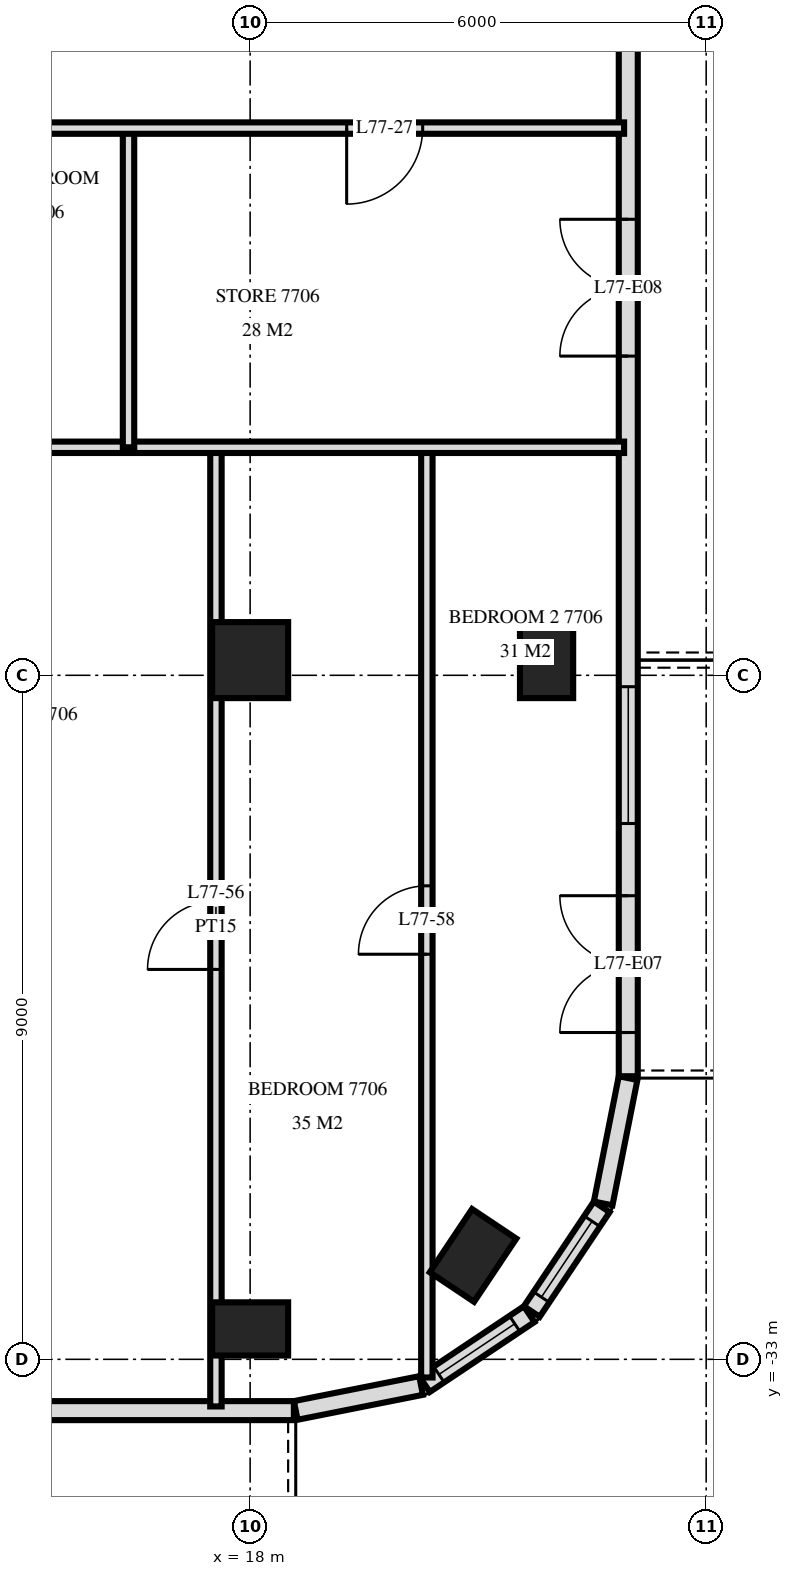
"""IFC4 building model, lengths in metres.
Left out: names, types, materials, properties, quantities, classifications, styles, units other than length and angle.
Written with IfcOpenShell. Run it as: python <this file> out.ifc"""

import sys

from ifc_helpers import new_model, si_unit, direction, frame, frame_2d, origin, origin_2d, place, context, subcontext, project, spatial, rectangle, extrude, element, fill, save


model = new_model("IFC4")
c1 = context("Model", 3, precision=1e-05, world=origin(), true_north=direction((0.0, 1.0)))
c2 = subcontext(c1, "Body", "Model", "MODEL_VIEW")
j1 = project(units=[si_unit("LENGTHUNIT", "METRE"), si_unit("PLANEANGLEUNIT", "RADIAN")], contexts=[c1])
p1 = place(None, origin())
s1 = spatial("IfcSite", under=j1, at=p1, CompositionType="ELEMENT")
p2 = place(p1, origin())
s2 = spatial("IfcBuilding", under=s1, at=p2, CompositionType="ELEMENT")
p3 = place(p2, frame((0.0, 0.0, 291.1)))
s3 = spatial("IfcBuildingStorey", under=s2, at=p3, CompositionType="ELEMENT", Elevation=291.1)
p4 = place(p3, frame((18.0, -32.6, 0.0), z_axis=(0.0, 0.0, 1.0), x_axis=(1.0, 0.0, 0.0)))
e1 = element("IfcColumn", 1, at=p4, inside=s3, PredefinedType="COLUMN", context=c2, shape_type="SweptSolid", body=[
    extrude(rectangle(XDim=1.0, YDim=0.7, at=origin_2d()), origin(), (0.0, 0.0, 1.0), 3.5),
])
p5 = place(p3, frame((18.0, -23.8, 0.0), z_axis=(0.0, 0.0, 1.0), x_axis=(1.0, 0.0, 0.0)))
e2 = element("IfcColumn", 2, at=p5, inside=s3, PredefinedType="COLUMN", context=c2, shape_type="SweptSolid", body=[
    extrude(rectangle(XDim=1.0, YDim=1.0, at=origin_2d()), origin(), (0.0, 0.0, 1.0), 3.5),
])
for number, where, z_axis, x_axis in (
    (3, (20.933, -31.633, 0.0), (0.0, 0.0, 1.0), (0.556, 0.831, 0.0)),
    (4, (21.9, -23.8, 0.0), (0.0, 0.0, 1.0), (0.0, 1.0, 0.0)),
):
    element("IfcColumn", number, at=place(p3, frame(where, z_axis=z_axis, x_axis=x_axis)), inside=s3, PredefinedType="COLUMN", context=c2, shape_type="SweptSolid", body=[
        extrude(rectangle(XDim=1.0, YDim=0.7, at=origin_2d()), origin(), (0.0, 0.0, 1.0), 3.5),
    ])
p6 = place(p3, frame((-18.575, -33.675, 0.0), z_axis=(0.0, 0.0, 1.0), x_axis=(1.0, 0.0, 0.0)))
e5 = element("IfcWall", 5, at=p6, inside=s3, PredefinedType="SOLIDWALL", context=c2, shape_type="SweptSolid", body=[
    extrude(rectangle(XDim=37.151, YDim=0.25, at=frame_2d((18.575, 0.0))), origin(), (0.0, 0.0, 1.0), 3.22),
])
p7 = place(p6, frame((1.175, 0.0, 0.0)))
e6 = element("IfcOpeningElement", 6, at=p7, cuts=e5, PredefinedType="OPENING", context=c2, shape_type="SweptSolid", body=[
    extrude(rectangle(XDim=1.8, YDim=2.4, at=frame_2d((0.9, 1.2))), frame((0.0, 0.135, 0.0), z_axis=(0.0, -1.0, 0.0), x_axis=(1.0, 0.0, 0.0)), (0.0, 0.0, 1.0), 0.27),
])
p8 = place(p6, frame((4.4, 0.0, 0.9)))
e7 = element("IfcOpeningElement", 7, at=p8, cuts=e5, PredefinedType="OPENING", context=c2, shape_type="SweptSolid", body=[
    extrude(rectangle(XDim=1.8, YDim=1.5, at=frame_2d((0.9, 0.75))), frame((0.0, 0.135, 0.0), z_axis=(0.0, -1.0, 0.0), x_axis=(1.0, 0.0, 0.0)), (0.0, 0.0, 1.0), 0.27),
])
p9 = place(p6, frame((6.875, 0.0, 0.9)))
e8 = element("IfcOpeningElement", 8, at=p9, cuts=e5, PredefinedType="OPENING", context=c2, shape_type="SweptSolid", body=[
    extrude(rectangle(XDim=2.4, YDim=1.5, at=frame_2d((1.2, 0.75))), frame((0.0, 0.135, 0.0), z_axis=(0.0, -1.0, 0.0), x_axis=(1.0, 0.0, 0.0)), (0.0, 0.0, 1.0), 0.27),
])
p10 = place(p6, frame((10.175, 0.0, 0.0)))
e9 = element("IfcOpeningElement", 9, at=p10, cuts=e5, PredefinedType="OPENING", context=c2, shape_type="SweptSolid", body=[
    extrude(rectangle(XDim=1.8, YDim=2.4, at=frame_2d((0.9, 1.2))), frame((0.0, 0.135, 0.0), z_axis=(0.0, -1.0, 0.0), x_axis=(1.0, 0.0, 0.0)), (0.0, 0.0, 1.0), 0.27),
])
p11 = place(p6, frame((13.175, 0.0, 0.0)))
e10 = element("IfcOpeningElement", 10, at=p11, cuts=e5, PredefinedType="OPENING", context=c2, shape_type="SweptSolid", body=[
    extrude(rectangle(XDim=1.8, YDim=2.4, at=frame_2d((0.9, 1.2))), frame((0.0, 0.135, 0.0), z_axis=(0.0, -1.0, 0.0), x_axis=(1.0, 0.0, 0.0)), (0.0, 0.0, 1.0), 0.27),
])
p12 = place(p6, frame((15.875, 0.0, 0.9)))
e11 = element("IfcOpeningElement", 11, at=p12, cuts=e5, PredefinedType="OPENING", context=c2, shape_type="SweptSolid", body=[
    extrude(rectangle(XDim=2.4, YDim=1.5, at=frame_2d((1.2, 0.75))), frame((0.0, 0.135, 0.0), z_axis=(0.0, -1.0, 0.0), x_axis=(1.0, 0.0, 0.0)), (0.0, 0.0, 1.0), 0.27),
])
p13 = place(p6, frame((19.175, 0.0, 0.0)))
e12 = element("IfcOpeningElement", 12, at=p13, cuts=e5, PredefinedType="OPENING", context=c2, shape_type="SweptSolid", body=[
    extrude(rectangle(XDim=1.8, YDim=2.4, at=frame_2d((0.9, 1.2))), frame((0.0, 0.135, 0.0), z_axis=(0.0, -1.0, 0.0), x_axis=(1.0, 0.0, 0.0)), (0.0, 0.0, 1.0), 0.27),
])
p14 = place(p6, frame((21.875, 0.0, 0.9)))
e13 = element("IfcOpeningElement", 13, at=p14, cuts=e5, PredefinedType="OPENING", context=c2, shape_type="SweptSolid", body=[
    extrude(rectangle(XDim=2.4, YDim=1.5, at=frame_2d((1.2, 0.75))), frame((0.0, 0.135, 0.0), z_axis=(0.0, -1.0, 0.0), x_axis=(1.0, 0.0, 0.0)), (0.0, 0.0, 1.0), 0.27),
])
p15 = place(p6, frame((25.063, 0.0, 0.9)))
e14 = element("IfcOpeningElement", 14, at=p15, cuts=e5, PredefinedType="OPENING", context=c2, shape_type="SweptSolid", body=[
    extrude(rectangle(XDim=1.8, YDim=1.5, at=frame_2d((0.9, 0.75))), frame((0.0, 0.135, 0.0), z_axis=(0.0, -1.0, 0.0), x_axis=(1.0, 0.0, 0.0)), (0.0, 0.0, 1.0), 0.27),
])
p16 = place(p6, frame((27.838, 0.0, 0.0)))
e15 = element("IfcOpeningElement", 15, at=p16, cuts=e5, PredefinedType="OPENING", context=c2, shape_type="SweptSolid", body=[
    extrude(rectangle(XDim=1.8, YDim=2.4, at=frame_2d((0.9, 1.2))), frame((0.0, 0.135, 0.0), z_axis=(0.0, -1.0, 0.0), x_axis=(1.0, 0.0, 0.0)), (0.0, 0.0, 1.0), 0.27),
])
p17 = place(p6, frame((31.175, 0.0, 0.0)))
e16 = element("IfcOpeningElement", 16, at=p17, cuts=e5, PredefinedType="OPENING", context=c2, shape_type="SweptSolid", body=[
    extrude(rectangle(XDim=1.8, YDim=2.4, at=frame_2d((0.9, 1.2))), frame((0.0, 0.135, 0.0), z_axis=(0.0, -1.0, 0.0), x_axis=(1.0, 0.0, 0.0)), (0.0, 0.0, 1.0), 0.27),
])
p18 = place(p3, frame((18.6, -33.673, 0.0), z_axis=(0.0, 0.0, 1.0), x_axis=(0.980770110232, 0.195166572128, 0.0)))
e17 = element("IfcWall", 17, at=p18, inside=s3, PredefinedType="SOLIDWALL", context=c2, shape_type="SweptSolid", body=[
    extrude(rectangle(XDim=1.681, YDim=0.25, at=frame_2d((0.841, 0.0))), origin(), (0.0, 0.0, 1.0), 3.22),
])
p19 = place(p3, frame((20.294, -33.326, 0.0), z_axis=(0.0, 0.0, 1.0), x_axis=(0.831482937015, 0.55555029066, 0.0)))
e18 = element("IfcWall", 18, at=p19, inside=s3, PredefinedType="SOLIDWALL", context=c2, shape_type="SweptSolid", body=[
    extrude(rectangle(XDim=1.656, YDim=0.25, at=frame_2d((0.828, 0.0))), origin(), (0.0, 0.0, 1.0), 3.22),
])
p20 = place(p19, frame((0.228, 0.0, 0.9)))
e19 = element("IfcOpeningElement", 19, at=p20, cuts=e18, PredefinedType="OPENING", context=c2, shape_type="SweptSolid", body=[
    extrude(rectangle(XDim=1.2, YDim=1.5, at=frame_2d((0.6, 0.75))), frame((0.0, 0.135, 0.0), z_axis=(0.0, -1.0, 0.0), x_axis=(1.0, 0.0, 0.0)), (0.0, 0.0, 1.0), 0.27),
])
p21 = place(p3, frame((21.706, -32.371, 0.0), z_axis=(0.0, 0.0, 1.0), x_axis=(0.55555029066, 0.831482937015, 0.0)))
e20 = element("IfcWall", 20, at=p21, inside=s3, PredefinedType="SOLIDWALL", context=c2, shape_type="SweptSolid", body=[
    extrude(rectangle(XDim=1.656, YDim=0.25, at=frame_2d((0.828, 0.0))), origin(), (0.0, 0.0, 1.0), 3.22),
])
p22 = place(p21, frame((0.228, 0.0, 0.9)))
e21 = element("IfcOpeningElement", 21, at=p22, cuts=e20, PredefinedType="OPENING", context=c2, shape_type="SweptSolid", body=[
    extrude(rectangle(XDim=1.2, YDim=1.5, at=frame_2d((0.6, 0.75))), frame((0.0, 0.135, 0.0), z_axis=(0.0, -1.0, 0.0), x_axis=(1.0, 0.0, 0.0)), (0.0, 0.0, 1.0), 0.27),
])
p23 = place(p3, frame((22.645, -30.949, 0.0), z_axis=(0.0, 0.0, 1.0), x_axis=(0.19513878023, 0.980775640221, 0.0)))
e22 = element("IfcWall", 22, at=p23, inside=s3, PredefinedType="SOLIDWALL", context=c2, shape_type="SweptSolid", body=[
    extrude(rectangle(XDim=1.681, YDim=0.25, at=frame_2d((0.841, 0.0))), origin(), (0.0, 0.0, 1.0), 3.22),
])
p24 = place(p3, frame((22.975, -29.275, 0.0), z_axis=(0.0, 0.0, 1.0), x_axis=(0.0, 1.0, 0.0)))
e23 = element("IfcWall", 23, at=p24, inside=s3, PredefinedType="SOLIDWALL", context=c2, shape_type="SweptSolid", body=[
    extrude(rectangle(XDim=25.951, YDim=0.25, at=frame_2d((12.975, 0.0))), origin(), (0.0, 0.0, 1.0), 3.22),
])
p25 = place(p24, frame((0.575, 0.0, 0.0)))
e24 = element("IfcOpeningElement", 24, at=p25, cuts=e23, PredefinedType="OPENING", context=c2, shape_type="SweptSolid", body=[
    extrude(rectangle(XDim=1.8, YDim=2.4, at=frame_2d((0.9, 1.2))), frame((0.0, 0.135, 0.0), z_axis=(0.0, -1.0, 0.0), x_axis=(1.0, 0.0, 0.0)), (0.0, 0.0, 1.0), 0.27),
])
p26 = place(p24, frame((3.325, 0.0, 0.9)))
e25 = element("IfcOpeningElement", 25, at=p26, cuts=e23, PredefinedType="OPENING", context=c2, shape_type="SweptSolid", body=[
    extrude(rectangle(XDim=1.8, YDim=1.5, at=frame_2d((0.9, 0.75))), frame((0.0, 0.135, 0.0), z_axis=(0.0, -1.0, 0.0), x_axis=(1.0, 0.0, 0.0)), (0.0, 0.0, 1.0), 0.27),
])
p27 = place(p24, frame((9.475, 0.0, 0.0)))
e26 = element("IfcOpeningElement", 26, at=p27, cuts=e23, PredefinedType="OPENING", context=c2, shape_type="SweptSolid", body=[
    extrude(rectangle(XDim=1.8, YDim=2.4, at=frame_2d((0.9, 1.2))), frame((0.0, 0.135, 0.0), z_axis=(0.0, -1.0, 0.0), x_axis=(1.0, 0.0, 0.0)), (0.0, 0.0, 1.0), 0.27),
])
p28 = place(p24, frame((16.175, 0.0, 0.0)))
e27 = element("IfcOpeningElement", 27, at=p28, cuts=e23, PredefinedType="OPENING", context=c2, shape_type="SweptSolid", body=[
    extrude(rectangle(XDim=1.8, YDim=2.4, at=frame_2d((0.9, 1.2))), frame((0.0, 0.135, 0.0), z_axis=(0.0, -1.0, 0.0), x_axis=(1.0, 0.0, 0.0)), (0.0, 0.0, 1.0), 0.27),
])
p29 = place(p24, frame((22.675, 0.0, 0.0)))
e28 = element("IfcOpeningElement", 28, at=p29, cuts=e23, PredefinedType="OPENING", context=c2, shape_type="SweptSolid", body=[
    extrude(rectangle(XDim=1.8, YDim=2.4, at=frame_2d((0.9, 1.2))), frame((0.0, 0.135, 0.0), z_axis=(0.0, -1.0, 0.0), x_axis=(1.0, 0.0, 0.0)), (0.0, 0.0, 1.0), 0.27),
])
p30 = place(p3, frame((20.325, -33.239, 0.0), z_axis=(0.0, 0.0, 1.0), x_axis=(0.0, 1.0, 0.0)))
e29 = element("IfcWall", 29, at=p30, inside=s3, PredefinedType="PARTITIONING", context=c2, shape_type="SweptSolid", body=[
    extrude(rectangle(XDim=12.239, YDim=0.15, at=frame_2d((6.12, 0.0))), origin(), (0.0, 0.0, 1.0), 3.22),
])
p31 = place(p30, frame((5.569, 0.0, 0.0)))
e30 = element("IfcOpeningElement", 30, at=p31, cuts=e29, PredefinedType="OPENING", context=c2, shape_type="SweptSolid", body=[
    extrude(rectangle(XDim=0.9, YDim=2.1, at=frame_2d((0.45, 1.05))), frame((0.0, 0.085, 0.0), z_axis=(0.0, -1.0, 0.0), x_axis=(1.0, 0.0, 0.0)), (0.0, 0.0, 1.0), 0.17),
])
p32 = place(p3, frame((17.55, -33.62, 0.0), z_axis=(0.0, 0.0, 1.0), x_axis=(0.0, 1.0, 0.0)))
e31 = element("IfcWall", 31, at=p32, inside=s3, PredefinedType="PARTITIONING", context=c2, shape_type="SweptSolid", body=[
    extrude(rectangle(XDim=12.62, YDim=0.15, at=frame_2d((6.31, 0.0))), origin(), (0.0, 0.0, 1.0), 3.22),
])
p33 = place(p32, frame((5.75, 0.0, 0.0)))
e32 = element("IfcOpeningElement", 32, at=p33, cuts=e31, PredefinedType="OPENING", context=c2, shape_type="SweptSolid", body=[
    extrude(rectangle(XDim=0.9, YDim=2.1, at=frame_2d((0.45, 1.05))), frame((0.0, 0.085, 0.0), z_axis=(0.0, -1.0, 0.0), x_axis=(1.0, 0.0, 0.0)), (0.0, 0.0, 1.0), 0.17),
])
p34 = place(p3, frame((16.4, -21.0, 0.0), z_axis=(0.0, 0.0, 1.0), x_axis=(0.0, 1.0, 0.0)))
e33 = element("IfcWall", 33, at=p34, inside=s3, PredefinedType="PARTITIONING", context=c2, shape_type="SweptSolid", body=[
    extrude(rectangle(XDim=4.2, YDim=0.15, at=frame_2d((2.1, 0.0))), origin(), (0.0, 0.0, 1.0), 3.22),
])
p35 = place(p3, frame((14.0, -21.0, 0.0), z_axis=(0.0, 0.0, 1.0), x_axis=(1.0, 0.0, 0.0)))
e34 = element("IfcWall", 34, at=p35, inside=s3, PredefinedType="PARTITIONING", context=c2, shape_type="SweptSolid", body=[
    extrude(rectangle(XDim=8.92, YDim=0.15, at=frame_2d((4.46, 0.0))), origin(), (0.0, 0.0, 1.0), 3.22),
])
p36 = place(p3, frame((-22.92, -16.8, 0.0), z_axis=(0.0, 0.0, 1.0), x_axis=(1.0, 0.0, 0.0)))
e35 = element("IfcWall", 35, at=p36, inside=s3, PredefinedType="PARTITIONING", context=c2, shape_type="SweptSolid", body=[
    extrude(rectangle(XDim=45.84, YDim=0.15, at=frame_2d((22.92, 0.0))), origin(), (0.0, 0.0, 1.0), 3.22),
])
p37 = place(p36, frame((16.72, 0.0, 0.0)))
e36 = element("IfcOpeningElement", 36, at=p37, cuts=e35, PredefinedType="OPENING", context=c2, shape_type="SweptSolid", body=[
    extrude(rectangle(XDim=1.0, YDim=2.1, at=frame_2d((0.5, 1.05))), frame((0.0, 0.085, 0.0), z_axis=(0.0, -1.0, 0.0), x_axis=(1.0, 0.0, 0.0)), (0.0, 0.0, 1.0), 0.17),
])
p38 = place(p36, frame((18.52, 0.0, 0.0)))
e37 = element("IfcOpeningElement", 37, at=p38, cuts=e35, PredefinedType="OPENING", context=c2, shape_type="SweptSolid", body=[
    extrude(rectangle(XDim=1.0, YDim=2.1, at=frame_2d((0.5, 1.05))), frame((0.0, 0.085, 0.0), z_axis=(0.0, -1.0, 0.0), x_axis=(1.0, 0.0, 0.0)), (0.0, 0.0, 1.0), 0.17),
])
p39 = place(p36, frame((21.77, 0.0, 0.0)))
e38 = element("IfcOpeningElement", 38, at=p39, cuts=e35, PredefinedType="OPENING", context=c2, shape_type="SweptSolid", body=[
    extrude(rectangle(XDim=1.0, YDim=2.1, at=frame_2d((0.5, 1.05))), frame((0.0, 0.085, 0.0), z_axis=(0.0, -1.0, 0.0), x_axis=(1.0, 0.0, 0.0)), (0.0, 0.0, 1.0), 0.17),
])
p40 = place(p36, frame((23.07, 0.0, 0.0)))
e39 = element("IfcOpeningElement", 39, at=p40, cuts=e35, PredefinedType="OPENING", context=c2, shape_type="SweptSolid", body=[
    extrude(rectangle(XDim=1.0, YDim=2.1, at=frame_2d((0.5, 1.05))), frame((0.0, 0.085, 0.0), z_axis=(0.0, -1.0, 0.0), x_axis=(1.0, 0.0, 0.0)), (0.0, 0.0, 1.0), 0.17),
])
p41 = place(p36, frame((27.77, 0.0, 0.0)))
e40 = element("IfcOpeningElement", 40, at=p41, cuts=e35, PredefinedType="OPENING", context=c2, shape_type="SweptSolid", body=[
    extrude(rectangle(XDim=1.0, YDim=2.1, at=frame_2d((0.5, 1.05))), frame((0.0, 0.085, 0.0), z_axis=(0.0, -1.0, 0.0), x_axis=(1.0, 0.0, 0.0)), (0.0, 0.0, 1.0), 0.17),
])
p42 = place(p36, frame((7.02, 0.0, 0.0)))
e41 = element("IfcOpeningElement", 41, at=p42, cuts=e35, PredefinedType="OPENING", context=c2, shape_type="SweptSolid", body=[
    extrude(rectangle(XDim=1.0, YDim=2.1, at=frame_2d((0.5, 1.05))), frame((0.0, 0.085, 0.0), z_axis=(0.0, -1.0, 0.0), x_axis=(1.0, 0.0, 0.0)), (0.0, 0.0, 1.0), 0.17),
])
p43 = place(p36, frame((35.42, 0.0, 0.0)))
e42 = element("IfcOpeningElement", 42, at=p43, cuts=e35, PredefinedType="OPENING", context=c2, shape_type="SweptSolid", body=[
    extrude(rectangle(XDim=1.0, YDim=2.1, at=frame_2d((0.5, 1.05))), frame((0.0, 0.085, 0.0), z_axis=(0.0, -1.0, 0.0), x_axis=(1.0, 0.0, 0.0)), (0.0, 0.0, 1.0), 0.17),
])
p44 = place(p36, frame((42.19, 0.0, 0.0)))
e43 = element("IfcOpeningElement", 43, at=p44, cuts=e35, PredefinedType="OPENING", context=c2, shape_type="SweptSolid", body=[
    extrude(rectangle(XDim=1.0, YDim=2.1, at=frame_2d((0.5, 1.05))), frame((0.0, 0.085, 0.0), z_axis=(0.0, -1.0, 0.0), x_axis=(1.0, 0.0, 0.0)), (0.0, 0.0, 1.0), 0.17),
])
p45 = place(p20, origin())
e44 = element("IfcWindow", 44, at=p45, inside=s3, PartitioningType="SINGLE_PANEL", PredefinedType="WINDOW", context=c2, shape_type="SweptSolid", body=[
    extrude(rectangle(XDim=1.2, YDim=1.5, at=frame_2d((0.6, 0.75))), frame((0.0, 0.03, 0.0), z_axis=(0.0, -1.0, 0.0), x_axis=(1.0, 0.0, 0.0)), (0.0, 0.0, 1.0), 0.06),
])
fill(e19, e44)
p46 = place(p22, origin())
e45 = element("IfcWindow", 45, at=p46, inside=s3, PartitioningType="SINGLE_PANEL", PredefinedType="WINDOW", context=c2, shape_type="SweptSolid", body=[
    extrude(rectangle(XDim=1.2, YDim=1.5, at=frame_2d((0.6, 0.75))), frame((0.0, 0.03, 0.0), z_axis=(0.0, -1.0, 0.0), x_axis=(1.0, 0.0, 0.0)), (0.0, 0.0, 1.0), 0.06),
])
fill(e21, e45)
p47 = place(p25, origin())
e46 = element("IfcDoor", 46, at=p47, inside=s3, OperationType="DOUBLE_DOOR_SINGLE_SWING", PredefinedType="DOOR", context=c2, shape_type="SweptSolid", body=[
    extrude(rectangle(XDim=1.8, YDim=2.4, at=frame_2d((0.9, 1.2))), frame((0.0, 0.025, 0.0), z_axis=(0.0, -1.0, 0.0), x_axis=(1.0, 0.0, 0.0)), (0.0, 0.0, 1.0), 0.05),
])
fill(e24, e46)
p48 = place(p26, origin())
e47 = element("IfcWindow", 47, at=p48, inside=s3, PartitioningType="SINGLE_PANEL", PredefinedType="WINDOW", context=c2, shape_type="SweptSolid", body=[
    extrude(rectangle(XDim=1.8, YDim=1.5, at=frame_2d((0.9, 0.75))), frame((0.0, 0.03, 0.0), z_axis=(0.0, -1.0, 0.0), x_axis=(1.0, 0.0, 0.0)), (0.0, 0.0, 1.0), 0.06),
])
fill(e25, e47)
p49 = place(p27, origin())
e48 = element("IfcDoor", 48, at=p49, inside=s3, OperationType="DOUBLE_DOOR_SINGLE_SWING", PredefinedType="DOOR", context=c2, shape_type="SweptSolid", body=[
    extrude(rectangle(XDim=1.8, YDim=2.4, at=frame_2d((0.9, 1.2))), frame((0.0, 0.025, 0.0), z_axis=(0.0, -1.0, 0.0), x_axis=(1.0, 0.0, 0.0)), (0.0, 0.0, 1.0), 0.05),
])
fill(e26, e48)
p50 = place(p44, frame((0.5, 0.0, 0.0), z_axis=(0.0, 0.0, 1.0), x_axis=(-1.0, 0.0, 0.0)))
e49 = element("IfcDoor", 49, at=p50, inside=s3, OperationType="SINGLE_SWING_LEFT", PredefinedType="DOOR", context=c2, shape_type="SweptSolid", body=[
    extrude(rectangle(XDim=1.0, YDim=2.1, at=frame_2d((0.0, 1.05))), frame((0.0, -0.025, 0.0), z_axis=(0.0, 1.0, 0.0), x_axis=(-1.0, 0.0, 0.0)), (0.0, 0.0, 1.0), 0.05),
])
fill(e43, e49)
p51 = place(p33, origin())
e50 = element("IfcDoor", 50, at=p51, inside=s3, OperationType="SINGLE_SWING_RIGHT", PredefinedType="DOOR", context=c2, shape_type="SweptSolid", body=[
    extrude(rectangle(XDim=0.9, YDim=2.1, at=frame_2d((0.45, 1.05))), frame((0.0, 0.025, 0.0), z_axis=(0.0, -1.0, 0.0), x_axis=(1.0, 0.0, 0.0)), (0.0, 0.0, 1.0), 0.05),
])
fill(e32, e50)
p52 = place(p31, origin())
e51 = element("IfcDoor", 51, at=p52, inside=s3, OperationType="SINGLE_SWING_RIGHT", PredefinedType="DOOR", context=c2, shape_type="SweptSolid", body=[
    extrude(rectangle(XDim=0.9, YDim=2.1, at=frame_2d((0.45, 1.05))), frame((0.0, 0.025, 0.0), z_axis=(0.0, -1.0, 0.0), x_axis=(1.0, 0.0, 0.0)), (0.0, 0.0, 1.0), 0.05),
])
fill(e30, e51)
save(model, sys.argv[1])
